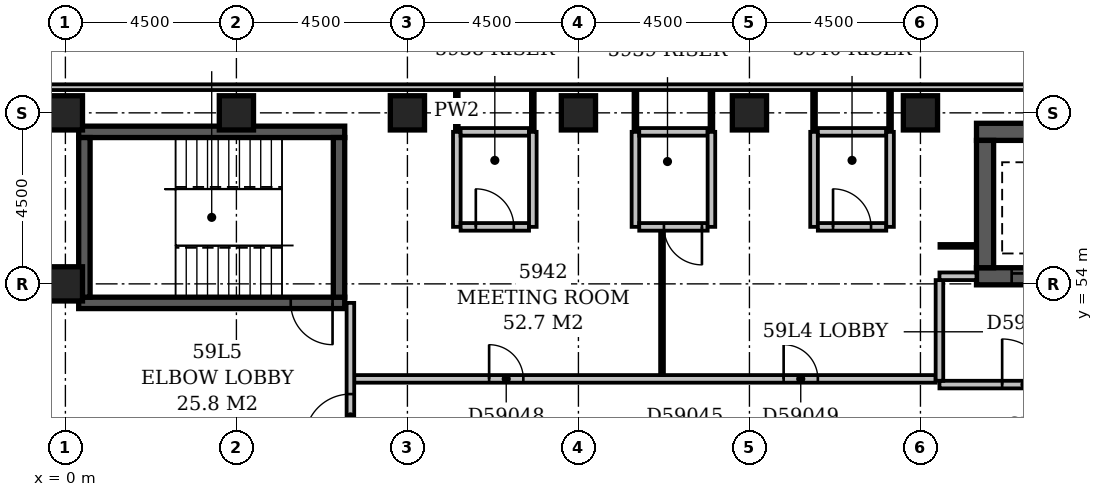
"""IFC4 building model, lengths in metres.
Left out: names, types, materials, properties, quantities, classifications, styles, units other than length and angle.
Written with IfcOpenShell. Run it as: python <this file> out.ifc"""

import sys

from ifc_helpers import new_model, si_unit, direction, frame, frame_2d, origin, origin_2d, place, context, subcontext, project, spatial, rectangle, extrude, element, fill, save


model = new_model("IFC4")
c1 = context("Model", 3, precision=1e-05, world=origin(), true_north=direction((0.0, 1.0)))
c2 = subcontext(c1, "Body", "Model", "MODEL_VIEW")
j1 = project(units=[si_unit("LENGTHUNIT", "METRE"), si_unit("PLANEANGLEUNIT", "RADIAN")], contexts=[c1])
p1 = place(None, origin())
s1 = spatial("IfcSite", under=j1, at=p1, CompositionType="ELEMENT")
p2 = place(p1, origin())
s2 = spatial("IfcBuilding", under=s1, at=p2, CompositionType="ELEMENT")
p3 = place(p2, frame((0.0, 0.0, 229.4)))
s3 = spatial("IfcBuildingStorey", under=s2, at=p3, CompositionType="ELEMENT", Elevation=229.4)
p4 = place(p3, frame((0.35, 53.5, -0.3), z_axis=(0.0, 0.0, 1.0), x_axis=(1.0, 0.0, 0.0)))
e1 = element("IfcWall", 1, at=p4, inside=s3, PredefinedType="SHEAR", context=c2, shape_type="SweptSolid", body=[
    extrude(rectangle(XDim=7.0, YDim=0.3, at=frame_2d((3.5, 0.0))), origin(), (0.0, 0.0, 1.0), 3.55),
])
p5 = place(p4, frame((5.58, 0.0, 0.3)))
e2 = element("IfcOpeningElement", 2, at=p5, cuts=e1, PredefinedType="OPENING", context=c2, shape_type="SweptSolid", body=[
    extrude(rectangle(XDim=1.1, YDim=2.1, at=frame_2d((0.55, 1.05))), frame((0.0, 0.162, 0.0), z_axis=(0.0, -1.0, 0.0), x_axis=(1.0, 0.0, 0.0)), (0.0, 0.0, 1.0), 0.324),
])
p6 = place(p3, frame((0.35, 58.0, -0.3), z_axis=(0.0, 0.0, 1.0), x_axis=(1.0, 0.0, 0.0)))
e3 = element("IfcWall", 3, at=p6, inside=s3, PredefinedType="SHEAR", context=c2, shape_type="SweptSolid", body=[
    extrude(rectangle(XDim=7.0, YDim=0.3, at=frame_2d((3.5, 0.0))), origin(), (0.0, 0.0, 1.0), 3.55),
])
for number, where, z_axis, x_axis in (
    (4, (0.5, 53.65, -0.3), (0.0, 0.0, 1.0), (0.0, 1.0, 0.0)),
    (5, (7.2, 53.65, -0.3), (0.0, 0.0, 1.0), (0.0, 1.0, 0.0)),
):
    element("IfcWall", number, at=place(p3, frame(where, z_axis=z_axis, x_axis=x_axis)), inside=s3, PredefinedType="SHEAR", context=c2, shape_type="SweptSolid", body=[
        extrude(rectangle(XDim=4.2, YDim=0.3, at=frame_2d((2.1, 0.0))), origin(), (0.0, 0.0, 1.0), 3.55),
    ])
p7 = place(p3, frame((23.975, 54.2, -0.3), z_axis=(0.0, 0.0, 1.0), x_axis=(1.0, 0.0, 0.0)))
e6 = element("IfcWall", 6, at=p7, inside=s3, PredefinedType="SHEAR", context=c2, shape_type="SweptSolid", body=[
    extrude(rectangle(XDim=2.95, YDim=0.45, at=frame_2d((1.475, 0.0))), origin(), (0.0, 0.0, 1.0), 3.55),
])
p8 = place(p7, frame((0.925, 0.0, 0.3)))
e7 = element("IfcOpeningElement", 7, at=p8, cuts=e6, PredefinedType="OPENING", context=c2, shape_type="SweptSolid", body=[
    extrude(rectangle(XDim=1.1, YDim=2.1, at=frame_2d((0.55, 1.05))), frame((0.0, 0.237, 0.0), z_axis=(0.0, -1.0, 0.0), x_axis=(1.0, 0.0, 0.0)), (0.0, 0.0, 1.0), 0.474),
])
p9 = place(p3, frame((23.975, 58.0, -0.3), z_axis=(0.0, 0.0, 1.0), x_axis=(1.0, 0.0, 0.0)))
e8 = element("IfcWall", 8, at=p9, inside=s3, PredefinedType="SHEAR", context=c2, shape_type="SweptSolid", body=[
    extrude(rectangle(XDim=2.95, YDim=0.45, at=frame_2d((1.475, 0.0))), origin(), (0.0, 0.0, 1.0), 3.55),
])
p10 = place(p3, frame((24.2, 54.425, -0.3), z_axis=(0.0, 0.0, 1.0), x_axis=(0.0, 1.0, 0.0)))
e9 = element("IfcWall", 9, at=p10, inside=s3, PredefinedType="SHEAR", context=c2, shape_type="SweptSolid", body=[
    extrude(rectangle(XDim=3.35, YDim=0.45, at=frame_2d((1.675, 0.0))), origin(), (0.0, 0.0, 1.0), 3.55),
])
for number, where, z_axis, x_axis in (
    (10, (0.0, 54.0, -0.3), (0.0, 0.0, 1.0), (1.0, 0.0, 0.0)),
    (11, (0.0, 58.5, -0.3), (0.0, 0.0, 1.0), (1.0, 0.0, 0.0)),
    (12, (4.5, 58.5, -0.3), (0.0, 0.0, 1.0), (1.0, 0.0, 0.0)),
    (13, (9.0, 58.5, -0.3), (0.0, 0.0, 1.0), (1.0, 0.0, 0.0)),
    (14, (13.5, 58.5, -0.3), (0.0, 0.0, 1.0), (1.0, 0.0, 0.0)),
    (15, (18.0, 58.5, -0.3), (0.0, 0.0, 1.0), (1.0, 0.0, 0.0)),
    (16, (22.5, 58.5, -0.3), (0.0, 0.0, 1.0), (1.0, 0.0, 0.0)),
):
    element("IfcColumn", number, at=place(p3, frame(where, z_axis=z_axis, x_axis=x_axis)), inside=s3, PredefinedType="COLUMN", context=c2, shape_type="SweptSolid", body=[
        extrude(rectangle(XDim=0.9, YDim=0.9, at=origin_2d()), origin(), (0.0, 0.0, 1.0), 3.55),
    ])
p11 = place(p3, frame((50.1, 59.175, 0.0), z_axis=(0.0, 0.0, 1.0), x_axis=(-1.0, 0.0, 0.0)))
e17 = element("IfcWall", 17, at=p11, inside=s3, PredefinedType="STANDARD", context=c2, shape_type="SweptSolid", body=[
    extrude(rectangle(XDim=50.85, YDim=0.15, at=frame_2d((25.425, 0.0))), origin(), (0.0, 0.0, 1.0), 2.7),
])
p12 = place(p3, frame((23.0, 51.35, 0.0), z_axis=(0.0, 0.0, 1.0), x_axis=(1.0, 0.0, 0.0)))
e18 = element("IfcWall", 18, at=p12, inside=s3, PredefinedType="PARTITIONING", context=c2, shape_type="SweptSolid", body=[
    extrude(rectangle(XDim=4.8, YDim=0.2, at=frame_2d((2.4, 0.0))), origin(), (0.0, 0.0, 1.0), 3.25),
])
p13 = place(p12, frame((1.65, 0.0, 0.0)))
e19 = element("IfcOpeningElement", 19, at=p13, cuts=e18, PredefinedType="OPENING", context=c2, shape_type="SweptSolid", body=[
    extrude(rectangle(XDim=1.2, YDim=2.1, at=frame_2d((0.6, 1.05))), frame((0.0, 0.112, 0.0), z_axis=(0.0, -1.0, 0.0), x_axis=(1.0, 0.0, 0.0)), (0.0, 0.0, 1.0), 0.224),
])
p14 = place(p3, frame((23.0, 54.2, 0.0), z_axis=(0.0, 0.0, 1.0), x_axis=(1.0, 0.0, 0.0)))
e20 = element("IfcWall", 20, at=p14, inside=s3, PredefinedType="PARTITIONING", context=c2, shape_type="SweptSolid", body=[
    extrude(rectangle(XDim=0.975, YDim=0.2, at=frame_2d((0.488, 0.0))), origin(), (0.0, 0.0, 1.0), 3.25),
])
p15 = place(p3, frame((23.0, 51.45, 0.0), z_axis=(0.0, 0.0, 1.0), x_axis=(0.0, 1.0, 0.0)))
e21 = element("IfcWall", 21, at=p15, inside=s3, PredefinedType="PARTITIONING", context=c2, shape_type="SweptSolid", body=[
    extrude(rectangle(XDim=2.65, YDim=0.2, at=frame_2d((1.325, 0.0))), origin(), (0.0, 0.0, 1.0), 3.25),
])
p16 = place(p3, frame((7.5, 49.6, 0.0), z_axis=(0.0, 0.0, 1.0), x_axis=(0.0, 1.0, 0.0)))
e22 = element("IfcWall", 22, at=p16, inside=s3, PredefinedType="PARTITIONING", context=c2, shape_type="SweptSolid", body=[
    extrude(rectangle(XDim=3.9, YDim=0.2, at=frame_2d((1.95, 0.0))), origin(), (0.0, 0.0, 1.0), 3.25),
])
p17 = place(p16, frame((0.3, 0.0, 0.0)))
e23 = element("IfcOpeningElement", 23, at=p17, cuts=e22, PredefinedType="OPENING", context=c2, shape_type="SweptSolid", body=[
    extrude(rectangle(XDim=1.2, YDim=2.1, at=frame_2d((0.6, 1.05))), frame((0.0, 0.112, 0.0), z_axis=(0.0, -1.0, 0.0), x_axis=(1.0, 0.0, 0.0)), (0.0, 0.0, 1.0), 0.224),
])
p18 = place(p3, frame((7.6, 51.5, 0.0), z_axis=(0.0, 0.0, 1.0), x_axis=(1.0, 0.0, 0.0)))
e24 = element("IfcWall", 24, at=p18, inside=s3, PredefinedType="PARTITIONING", context=c2, shape_type="SweptSolid", body=[
    extrude(rectangle(XDim=15.3, YDim=0.2, at=frame_2d((7.65, 0.0))), origin(), (0.0, 0.0, 1.0), 3.25),
])
p19 = place(p18, frame((3.55, 0.0, 0.0)))
e25 = element("IfcOpeningElement", 25, at=p19, cuts=e24, PredefinedType="OPENING", context=c2, shape_type="SweptSolid", body=[
    extrude(rectangle(XDim=0.9, YDim=2.1, at=frame_2d((0.45, 1.05))), frame((0.0, 0.112, 0.0), z_axis=(0.0, -1.0, 0.0), x_axis=(1.0, 0.0, 0.0)), (0.0, 0.0, 1.0), 0.224),
])
p20 = place(p18, frame((11.3, 0.0, 0.0)))
e26 = element("IfcOpeningElement", 26, at=p20, cuts=e24, PredefinedType="OPENING", context=c2, shape_type="SweptSolid", body=[
    extrude(rectangle(XDim=0.9, YDim=2.1, at=frame_2d((0.45, 1.05))), frame((0.0, 0.112, 0.0), z_axis=(0.0, -1.0, 0.0), x_axis=(1.0, 0.0, 0.0)), (0.0, 0.0, 1.0), 0.224),
])
p21 = place(p3, frame((15.7, 51.6, 0.0), z_axis=(0.0, 0.0, 1.0), x_axis=(0.0, 1.0, 0.0)))
e27 = element("IfcWall", 27, at=p21, inside=s3, PredefinedType="PARTITIONING", context=c2, shape_type="SweptSolid", body=[
    extrude(rectangle(XDim=3.8, YDim=0.1, at=frame_2d((1.9, 0.0))), origin(), (0.0, 0.0, 1.0), 3.25),
])
p22 = place(p3, frame((23.0, 55.0, 0.0), z_axis=(0.0, 0.0, 1.0), x_axis=(1.0, 0.0, 0.0)))
e28 = element("IfcWall", 28, at=p22, inside=s3, PredefinedType="PARTITIONING", context=c2, shape_type="SweptSolid", body=[
    extrude(rectangle(XDim=0.975, YDim=0.1, at=frame_2d((0.488, 0.0))), origin(), (0.0, 0.0, 1.0), 3.25),
])
p23 = place(p3, frame((10.3, 55.5, 0.0), z_axis=(0.0, 0.0, 1.0), x_axis=(0.0, 1.0, 0.0)))
e29 = element("IfcWall", 29, at=p23, inside=s3, PredefinedType="PARTITIONING", context=c2, shape_type="SweptSolid", body=[
    extrude(rectangle(XDim=2.5, YDim=0.2, at=frame_2d((1.25, 0.0))), origin(), (0.0, 0.0, 1.0), 3.25),
])
p24 = place(p3, frame((10.4, 55.5, 0.0), z_axis=(0.0, 0.0, 1.0), x_axis=(1.0, 0.0, 0.0)))
e30 = element("IfcWall", 30, at=p24, inside=s3, PredefinedType="PARTITIONING", context=c2, shape_type="SweptSolid", body=[
    extrude(rectangle(XDim=1.8, YDim=0.2, at=frame_2d((0.9, 0.0))), origin(), (0.0, 0.0, 1.0), 3.25),
])
p25 = place(p24, frame((0.4, 0.0, 0.0)))
e31 = element("IfcOpeningElement", 31, at=p25, cuts=e30, PredefinedType="OPENING", context=c2, shape_type="SweptSolid", body=[
    extrude(rectangle(XDim=1.0, YDim=2.1, at=frame_2d((0.5, 1.05))), frame((0.0, 0.112, 0.0), z_axis=(0.0, -1.0, 0.0), x_axis=(1.0, 0.0, 0.0)), (0.0, 0.0, 1.0), 0.224),
])
for number, where, z_axis, x_axis in (
    (32, (12.3, 55.5, 0.0), (0.0, 0.0, 1.0), (0.0, 1.0, 0.0)),
    (33, (15.0, 55.5, 0.0), (0.0, 0.0, 1.0), (0.0, 1.0, 0.0)),
):
    element("IfcWall", number, at=place(p3, frame(where, z_axis=z_axis, x_axis=x_axis)), inside=s3, PredefinedType="PARTITIONING", context=c2, shape_type="SweptSolid", body=[
        extrude(rectangle(XDim=2.5, YDim=0.2, at=frame_2d((1.25, 0.0))), origin(), (0.0, 0.0, 1.0), 3.25),
    ])
p26 = place(p3, frame((15.1, 55.5, 0.0), z_axis=(0.0, 0.0, 1.0), x_axis=(1.0, 0.0, 0.0)))
e34 = element("IfcWall", 34, at=p26, inside=s3, PredefinedType="PARTITIONING", context=c2, shape_type="SweptSolid", body=[
    extrude(rectangle(XDim=1.8, YDim=0.2, at=frame_2d((0.9, 0.0))), origin(), (0.0, 0.0, 1.0), 3.25),
])
p27 = place(p26, frame((0.65, 0.0, 0.0)))
e35 = element("IfcOpeningElement", 35, at=p27, cuts=e34, PredefinedType="OPENING", context=c2, shape_type="SweptSolid", body=[
    extrude(rectangle(XDim=1.0, YDim=2.1, at=frame_2d((0.5, 1.05))), frame((0.0, 0.112, 0.0), z_axis=(0.0, -1.0, 0.0), x_axis=(1.0, 0.0, 0.0)), (0.0, 0.0, 1.0), 0.224),
])
for number, where, z_axis, x_axis in (
    (36, (17.0, 55.5, 0.0), (0.0, 0.0, 1.0), (0.0, 1.0, 0.0)),
    (37, (19.7, 55.5, 0.0), (0.0, 0.0, 1.0), (0.0, 1.0, 0.0)),
):
    element("IfcWall", number, at=place(p3, frame(where, z_axis=z_axis, x_axis=x_axis)), inside=s3, PredefinedType="PARTITIONING", context=c2, shape_type="SweptSolid", body=[
        extrude(rectangle(XDim=2.5, YDim=0.2, at=frame_2d((1.25, 0.0))), origin(), (0.0, 0.0, 1.0), 3.25),
    ])
p28 = place(p3, frame((19.8, 55.5, 0.0), z_axis=(0.0, 0.0, 1.0), x_axis=(1.0, 0.0, 0.0)))
e38 = element("IfcWall", 38, at=p28, inside=s3, PredefinedType="PARTITIONING", context=c2, shape_type="SweptSolid", body=[
    extrude(rectangle(XDim=1.8, YDim=0.2, at=frame_2d((0.9, 0.0))), origin(), (0.0, 0.0, 1.0), 3.25),
])
p29 = place(p28, frame((0.4, 0.0, 0.0)))
e39 = element("IfcOpeningElement", 39, at=p29, cuts=e38, PredefinedType="OPENING", context=c2, shape_type="SweptSolid", body=[
    extrude(rectangle(XDim=1.0, YDim=2.1, at=frame_2d((0.5, 1.05))), frame((0.0, 0.112, 0.0), z_axis=(0.0, -1.0, 0.0), x_axis=(1.0, 0.0, 0.0)), (0.0, 0.0, 1.0), 0.224),
])
p30 = place(p3, frame((21.7, 55.5, 0.0), z_axis=(0.0, 0.0, 1.0), x_axis=(0.0, 1.0, 0.0)))
e40 = element("IfcWall", 40, at=p30, inside=s3, PredefinedType="PARTITIONING", context=c2, shape_type="SweptSolid", body=[
    extrude(rectangle(XDim=2.5, YDim=0.2, at=frame_2d((1.25, 0.0))), origin(), (0.0, 0.0, 1.0), 3.25),
])
p31 = place(p3, frame((10.3, 58.0, 0.0), z_axis=(0.0, 0.0, 1.0), x_axis=(0.0, 1.0, 0.0)))
e41 = element("IfcWall", 41, at=p31, inside=s3, PredefinedType="PARTITIONING", context=c2, shape_type="SweptSolid", body=[
    extrude(rectangle(XDim=1.1, YDim=0.1, at=frame_2d((0.55, 0.0))), origin(), (0.0, 0.0, 1.0), 3.25),
])
p32 = place(p3, frame((10.4, 58.0, 0.0), z_axis=(0.0, 0.0, 1.0), x_axis=(1.0, 0.0, 0.0)))
e42 = element("IfcWall", 42, at=p32, inside=s3, PredefinedType="PARTITIONING", context=c2, shape_type="SweptSolid", body=[
    extrude(rectangle(XDim=1.8, YDim=0.2, at=frame_2d((0.9, 0.0))), origin(), (0.0, 0.0, 1.0), 3.25),
])
for number, where, z_axis, x_axis in (
    (43, (12.3, 58.0, 0.0), (0.0, 0.0, 1.0), (0.0, 1.0, 0.0)),
    (44, (15.0, 58.0, 0.0), (0.0, 0.0, 1.0), (0.0, 1.0, 0.0)),
):
    element("IfcWall", number, at=place(p3, frame(where, z_axis=z_axis, x_axis=x_axis)), inside=s3, PredefinedType="PARTITIONING", context=c2, shape_type="SweptSolid", body=[
        extrude(rectangle(XDim=1.1, YDim=0.1, at=frame_2d((0.55, 0.0))), origin(), (0.0, 0.0, 1.0), 3.25),
    ])
p33 = place(p3, frame((15.1, 58.0, 0.0), z_axis=(0.0, 0.0, 1.0), x_axis=(1.0, 0.0, 0.0)))
e45 = element("IfcWall", 45, at=p33, inside=s3, PredefinedType="PARTITIONING", context=c2, shape_type="SweptSolid", body=[
    extrude(rectangle(XDim=1.8, YDim=0.2, at=frame_2d((0.9, 0.0))), origin(), (0.0, 0.0, 1.0), 3.25),
])
for number, where, z_axis, x_axis in (
    (46, (17.0, 58.0, 0.0), (0.0, 0.0, 1.0), (0.0, 1.0, 0.0)),
    (47, (19.7, 58.0, 0.0), (0.0, 0.0, 1.0), (0.0, 1.0, 0.0)),
):
    element("IfcWall", number, at=place(p3, frame(where, z_axis=z_axis, x_axis=x_axis)), inside=s3, PredefinedType="PARTITIONING", context=c2, shape_type="SweptSolid", body=[
        extrude(rectangle(XDim=1.1, YDim=0.1, at=frame_2d((0.55, 0.0))), origin(), (0.0, 0.0, 1.0), 3.25),
    ])
p34 = place(p3, frame((19.8, 58.0, 0.0), z_axis=(0.0, 0.0, 1.0), x_axis=(1.0, 0.0, 0.0)))
e48 = element("IfcWall", 48, at=p34, inside=s3, PredefinedType="PARTITIONING", context=c2, shape_type="SweptSolid", body=[
    extrude(rectangle(XDim=1.8, YDim=0.2, at=frame_2d((0.9, 0.0))), origin(), (0.0, 0.0, 1.0), 3.25),
])
p35 = place(p3, frame((21.7, 58.0, 0.0), z_axis=(0.0, 0.0, 1.0), x_axis=(0.0, 1.0, 0.0)))
e49 = element("IfcWall", 49, at=p35, inside=s3, PredefinedType="PARTITIONING", context=c2, shape_type="SweptSolid", body=[
    extrude(rectangle(XDim=1.1, YDim=0.1, at=frame_2d((0.55, 0.0))), origin(), (0.0, 0.0, 1.0), 3.25),
])
p36 = place(p17, origin())
e50 = element("IfcDoor", 50, at=p36, inside=s3, OperationType="SINGLE_SWING_LEFT", PredefinedType="DOOR", context=c2, shape_type="SweptSolid", body=[
    extrude(rectangle(XDim=1.2, YDim=2.1, at=frame_2d((0.6, 1.05))), frame((0.0, 0.025, 0.0), z_axis=(0.0, -1.0, 0.0), x_axis=(1.0, 0.0, 0.0)), (0.0, 0.0, 1.0), 0.05),
])
fill(e23, e50)
p37 = place(p13, origin())
e51 = element("IfcDoor", 51, at=p37, inside=s3, OperationType="SINGLE_SWING_LEFT", PredefinedType="DOOR", context=c2, shape_type="SweptSolid", body=[
    extrude(rectangle(XDim=1.2, YDim=2.1, at=frame_2d((0.6, 1.05))), frame((0.0, 0.025, 0.0), z_axis=(0.0, -1.0, 0.0), x_axis=(1.0, 0.0, 0.0)), (0.0, 0.0, 1.0), 0.05),
])
fill(e19, e51)
p38 = place(p8, origin())
e52 = element("IfcDoor", 52, at=p38, inside=s3, OperationType="SLIDING_TO_LEFT", PredefinedType="DOOR", context=c2, shape_type="SweptSolid", body=[
    extrude(rectangle(XDim=1.1, YDim=2.1, at=frame_2d((0.55, 1.05))), frame((0.0, 0.025, 0.0), z_axis=(0.0, -1.0, 0.0), x_axis=(1.0, 0.0, 0.0)), (0.0, 0.0, 1.0), 0.05),
])
fill(e7, e52)
p39 = place(p5, origin())
e53 = element("IfcDoor", 53, at=p39, inside=s3, OperationType="SINGLE_SWING_RIGHT", PredefinedType="DOOR", context=c2, shape_type="SweptSolid", body=[
    extrude(rectangle(XDim=1.1, YDim=2.1, at=frame_2d((0.55, 1.05))), frame((0.0, 0.025, 0.0), z_axis=(0.0, -1.0, 0.0), x_axis=(1.0, 0.0, 0.0)), (0.0, 0.0, 1.0), 0.05),
])
fill(e2, e53)
p40 = place(p19, origin())
e54 = element("IfcDoor", 54, at=p40, inside=s3, OperationType="SINGLE_SWING_LEFT", PredefinedType="DOOR", context=c2, shape_type="SweptSolid", body=[
    extrude(rectangle(XDim=0.9, YDim=2.1, at=frame_2d((0.45, 1.05))), frame((0.0, 0.025, 0.0), z_axis=(0.0, -1.0, 0.0), x_axis=(1.0, 0.0, 0.0)), (0.0, 0.0, 1.0), 0.05),
])
fill(e25, e54)
p41 = place(p20, origin())
e55 = element("IfcDoor", 55, at=p41, inside=s3, OperationType="SINGLE_SWING_LEFT", PredefinedType="DOOR", context=c2, shape_type="SweptSolid", body=[
    extrude(rectangle(XDim=0.9, YDim=2.1, at=frame_2d((0.45, 1.05))), frame((0.0, 0.025, 0.0), z_axis=(0.0, -1.0, 0.0), x_axis=(1.0, 0.0, 0.0)), (0.0, 0.0, 1.0), 0.05),
])
fill(e26, e55)
p42 = place(p25, origin())
e56 = element("IfcDoor", 56, at=p42, inside=s3, OperationType="SINGLE_SWING_LEFT", PredefinedType="DOOR", context=c2, shape_type="SweptSolid", body=[
    extrude(rectangle(XDim=1.0, YDim=2.1, at=frame_2d((0.5, 1.05))), frame((0.0, 0.025, 0.0), z_axis=(0.0, -1.0, 0.0), x_axis=(1.0, 0.0, 0.0)), (0.0, 0.0, 1.0), 0.05),
])
fill(e31, e56)
p43 = place(p27, origin())
e57 = element("IfcDoor", 57, at=p43, inside=s3, OperationType="SINGLE_SWING_RIGHT", PredefinedType="DOOR", context=c2, shape_type="SweptSolid", body=[
    extrude(rectangle(XDim=1.0, YDim=2.1, at=frame_2d((0.5, 1.05))), frame((0.0, 0.025, 0.0), z_axis=(0.0, -1.0, 0.0), x_axis=(1.0, 0.0, 0.0)), (0.0, 0.0, 1.0), 0.05),
])
fill(e35, e57)
p44 = place(p29, origin())
e58 = element("IfcDoor", 58, at=p44, inside=s3, OperationType="SINGLE_SWING_LEFT", PredefinedType="DOOR", context=c2, shape_type="SweptSolid", body=[
    extrude(rectangle(XDim=1.0, YDim=2.1, at=frame_2d((0.5, 1.05))), frame((0.0, 0.025, 0.0), z_axis=(0.0, -1.0, 0.0), x_axis=(1.0, 0.0, 0.0)), (0.0, 0.0, 1.0), 0.05),
])
fill(e39, e58)
save(model, sys.argv[1])
